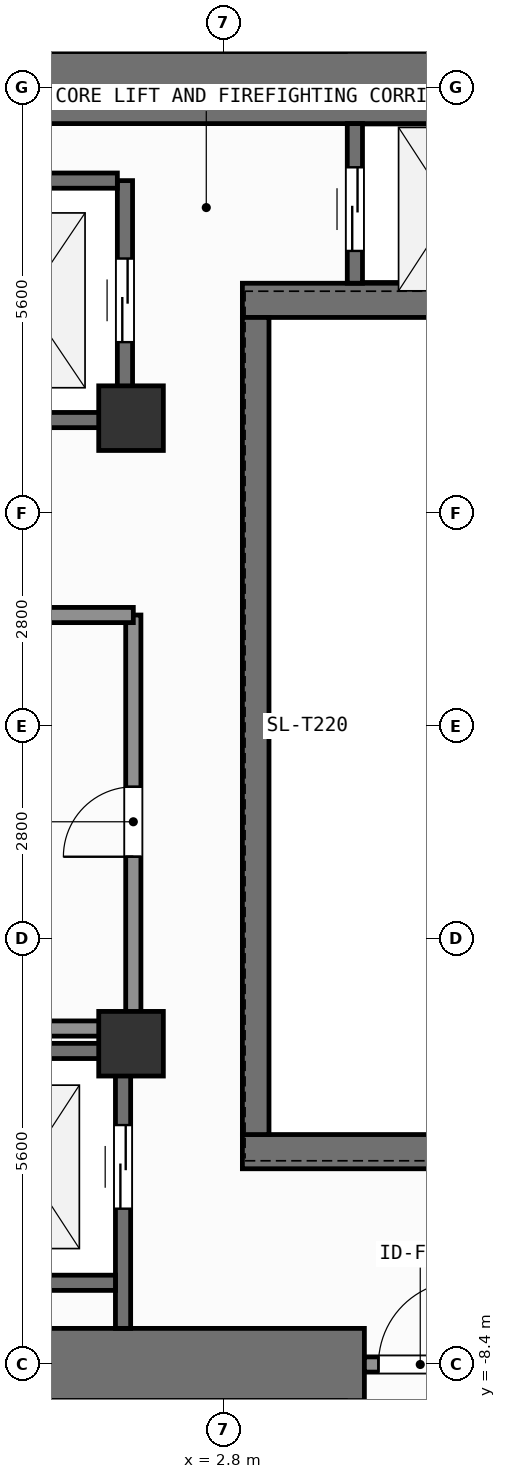
"""IFC4 building model, lengths in metres.
Left out: names, types, materials, properties, quantities, classifications, styles, units other than length and angle.
Written with IfcOpenShell. Run it as: python <this file> out.ifc"""

import sys

from ifc_helpers import new_model, si_unit, direction, frame, frame_2d, origin, origin_2d, place, context, subcontext, project, spatial, rectangle, extrude, element, fill, save


model = new_model("IFC4")
c1 = context("Model", 3, precision=1e-05, world=origin(), true_north=direction((0.0, 1.0)))
c2 = subcontext(c1, "Body", "Model", "MODEL_VIEW")
j1 = project(units=[si_unit("LENGTHUNIT", "METRE"), si_unit("PLANEANGLEUNIT", "RADIAN")], contexts=[c1])
p1 = place(None, origin())
s1 = spatial("IfcSite", under=j1, at=p1, CompositionType="ELEMENT")
p2 = place(p1, origin())
s2 = spatial("IfcBuilding", under=s1, at=p2, CompositionType="ELEMENT")
p3 = place(p2, frame((0.0, 0.0, 152.4)))
s3 = spatial("IfcBuildingStorey", under=s2, at=p3, CompositionType="ELEMENT", Elevation=152.4)
p4 = place(p3, frame((-2.62, -8.4, 0.0), z_axis=(0.0, 0.0, 1.0), x_axis=(1.0, 0.0, 0.0)))
e1 = element("IfcWall", 1, at=p4, inside=s3, PredefinedType="SHEAR", context=c2, shape_type="SweptSolid", body=[
    extrude(rectangle(XDim=7.27, YDim=0.95, at=frame_2d((3.635, 0.0))), origin(), (0.0, 0.0, 1.0), 3.9),
])
p5 = place(p3, frame((-7.55, 8.4, 0.0), z_axis=(0.0, 0.0, 1.0), x_axis=(1.0, 0.0, 0.0)))
e2 = element("IfcWall", 2, at=p5, inside=s3, PredefinedType="SHEAR", context=c2, shape_type="SweptSolid", body=[
    extrude(rectangle(XDim=16.425, YDim=0.95, at=frame_2d((8.212, 0.0))), origin(), (0.0, 0.0, 1.0), 3.9),
])
for number, where, z_axis, x_axis in (
    (3, (3.045, -5.6, 0.0), (0.0, 0.0, 1.0), (1.0, 0.0, 0.0)),
    (4, (3.045, 5.6, 0.0), (0.0, 0.0, 1.0), (1.0, 0.0, 0.0)),
):
    element("IfcWall", number, at=place(p3, frame(where, z_axis=z_axis, x_axis=x_axis)), inside=s3, PredefinedType="SHEAR", context=c2, shape_type="SweptSolid", body=[
        extrude(rectangle(XDim=5.83, YDim=0.45, at=frame_2d((2.915, 0.0))), origin(), (0.0, 0.0, 1.0), 3.9),
    ])
p6 = place(p3, frame((3.22, -5.375, 0.0), z_axis=(0.0, 0.0, 1.0), x_axis=(0.0, 1.0, 0.0)))
e5 = element("IfcWall", 5, at=p6, inside=s3, PredefinedType="SHEAR", context=c2, shape_type="SweptSolid", body=[
    extrude(rectangle(XDim=10.75, YDim=0.35, at=frame_2d((5.375, 0.0))), origin(), (0.0, 0.0, 1.0), 3.9),
])
for number, where, z_axis, x_axis in (
    (6, (1.58, -4.18, 0.0), (0.0, 0.0, 1.0), (1.0, 0.0, 0.0)),
    (7, (1.58, 4.05, 0.0), (0.0, 0.0, 1.0), (1.0, 0.0, 0.0)),
):
    element("IfcColumn", number, at=place(p3, frame(where, z_axis=z_axis, x_axis=x_axis)), inside=s3, PredefinedType="COLUMN", context=c2, shape_type="SweptSolid", body=[
        extrude(rectangle(XDim=0.85, YDim=0.85, at=origin_2d()), origin(), (0.0, 0.0, 1.0), 3.9),
    ])
p7 = place(p3, frame((1.5, 4.025, 0.0), z_axis=(0.0, 0.0, 1.0), x_axis=(0.0, 1.0, 0.0)))
e8 = element("IfcWall", 8, at=p7, inside=s3, PredefinedType="SHEAR", context=c2, shape_type="SweptSolid", body=[
    extrude(rectangle(XDim=3.15, YDim=0.2, at=frame_2d((1.575, 0.0))), origin(), (0.0, 0.0, 1.0), 3.6),
])
p8 = place(p7, frame((1.025, 0.0, 0.0)))
e9 = element("IfcOpeningElement", 9, at=p8, cuts=e8, PredefinedType="OPENING", context=c2, shape_type="SweptSolid", body=[
    extrude(rectangle(XDim=1.1, YDim=2.2, at=frame_2d((0.55, 1.1))), frame((0.0, 0.11, 0.0), z_axis=(0.0, -1.0, 0.0), x_axis=(1.0, 0.0, 0.0)), (0.0, 0.0, 1.0), 0.22),
])
for number, where, z_axis, x_axis in (
    (10, (-1.0, 4.025, 0.0), (0.0, 0.0, 1.0), (1.0, 0.0, 0.0)),
    (11, (-1.0, 7.175, 0.0), (0.0, 0.0, 1.0), (1.0, 0.0, 0.0)),
):
    element("IfcWall", number, at=place(p3, frame(where, z_axis=z_axis, x_axis=x_axis)), inside=s3, PredefinedType="SHEAR", context=c2, shape_type="SweptSolid", body=[
        extrude(rectangle(XDim=2.4, YDim=0.2, at=frame_2d((1.2, 0.0))), origin(), (0.0, 0.0, 1.0), 3.6),
    ])
p9 = place(p3, frame((1.475, -7.925, 0.0), z_axis=(0.0, 0.0, 1.0), x_axis=(0.0, 1.0, 0.0)))
e12 = element("IfcWall", 12, at=p9, inside=s3, PredefinedType="SHEAR", context=c2, shape_type="SweptSolid", body=[
    extrude(rectangle(XDim=3.65, YDim=0.2, at=frame_2d((1.825, 0.0))), origin(), (0.0, 0.0, 1.0), 3.6),
])
p10 = place(p9, frame((1.575, 0.0, 0.0)))
e13 = element("IfcOpeningElement", 13, at=p10, cuts=e12, PredefinedType="OPENING", context=c2, shape_type="SweptSolid", body=[
    extrude(rectangle(XDim=1.1, YDim=2.2, at=frame_2d((0.55, 1.1))), frame((0.0, 0.11, 0.0), z_axis=(0.0, -1.0, 0.0), x_axis=(1.0, 0.0, 0.0)), (0.0, 0.0, 1.0), 0.22),
])
for number, where, z_axis, x_axis in (
    (14, (-0.975, -7.325, 0.0), (0.0, 0.0, 1.0), (1.0, 0.0, 0.0)),
    (15, (-0.975, -4.275, 0.0), (0.0, 0.0, 1.0), (1.0, 0.0, 0.0)),
):
    element("IfcWall", number, at=place(p3, frame(where, z_axis=z_axis, x_axis=x_axis)), inside=s3, PredefinedType="SHEAR", context=c2, shape_type="SweptSolid", body=[
        extrude(rectangle(XDim=2.35, YDim=0.2, at=frame_2d((1.175, 0.0))), origin(), (0.0, 0.0, 1.0), 3.6),
    ])
p11 = place(p3, frame((4.525, 5.825, 0.0), z_axis=(0.0, 0.0, 1.0), x_axis=(0.0, 1.0, 0.0)))
e16 = element("IfcWall", 16, at=p11, inside=s3, PredefinedType="SHEAR", context=c2, shape_type="SweptSolid", body=[
    extrude(rectangle(XDim=2.1, YDim=0.2, at=frame_2d((1.05, 0.0))), origin(), (0.0, 0.0, 1.0), 3.6),
])
p12 = place(p11, frame((0.425, 0.0, 0.0)))
e17 = element("IfcOpeningElement", 17, at=p12, cuts=e16, PredefinedType="OPENING", context=c2, shape_type="SweptSolid", body=[
    extrude(rectangle(XDim=1.1, YDim=2.2, at=frame_2d((0.55, 1.1))), frame((0.0, 0.11, 0.0), z_axis=(0.0, -1.0, 0.0), x_axis=(1.0, 0.0, 0.0)), (0.0, 0.0, 1.0), 0.22),
])
p13 = place(p3, frame((4.65, -8.4, 0.0), z_axis=(0.0, 0.0, 1.0), x_axis=(1.0, 0.0, 0.0)))
e18 = element("IfcWall", 18, at=p13, inside=s3, PredefinedType="SOLIDWALL", context=c2, shape_type="SweptSolid", body=[
    extrude(rectangle(XDim=1.47, YDim=0.2, at=frame_2d((0.735, 0.0))), origin(), (0.0, 0.0, 1.0), 2.64),
])
p14 = place(p13, frame((0.185, 0.0, 0.0)))
e19 = element("IfcOpeningElement", 19, at=p14, cuts=e18, PredefinedType="OPENING", context=c2, shape_type="SweptSolid", body=[
    extrude(rectangle(XDim=1.1, YDim=2.15, at=frame_2d((0.55, 1.075))), frame((0.0, 0.11, 0.0), z_axis=(0.0, -1.0, 0.0), x_axis=(1.0, 0.0, 0.0)), (0.0, 0.0, 1.0), 0.22),
])
p15 = place(p3, frame((1.61, -3.98, 0.0), z_axis=(0.0, 0.0, 1.0), x_axis=(0.0, 1.0, 0.0)))
e20 = element("IfcWall", 20, at=p15, inside=s3, PredefinedType="SOLIDWALL", context=c2, shape_type="SweptSolid", body=[
    extrude(rectangle(XDim=5.44, YDim=0.2, at=frame_2d((2.72, 0.0))), origin(), (0.0, 0.0, 1.0), 3.6),
])
p16 = place(p15, frame((2.26, 0.0, 0.0)))
e21 = element("IfcOpeningElement", 21, at=p16, cuts=e20, PredefinedType="OPENING", context=c2, shape_type="SweptSolid", body=[
    extrude(rectangle(XDim=0.92, YDim=2.1, at=frame_2d((0.46, 1.05))), frame((0.0, 0.11, 0.0), z_axis=(0.0, -1.0, 0.0), x_axis=(1.0, 0.0, 0.0)), (0.0, 0.0, 1.0), 0.22),
])
for number, where, z_axis, x_axis in (
    (22, (-1.58, -3.98, 0.0), (0.0, 0.0, 1.0), (1.0, 0.0, 0.0)),
    (23, (-1.58, 1.46, 0.0), (0.0, 0.0, 1.0), (1.0, 0.0, 0.0)),
):
    element("IfcWall", number, at=place(p3, frame(where, z_axis=z_axis, x_axis=x_axis)), inside=s3, PredefinedType="SOLIDWALL", context=c2, shape_type="SweptSolid", body=[
        extrude(rectangle(XDim=3.19, YDim=0.2, at=frame_2d((1.595, 0.0))), origin(), (0.0, 0.0, 1.0), 3.6),
    ])
p17 = place(p8, origin())
e24 = element("IfcDoor", 24, at=p17, inside=s3, OperationType="SLIDING_TO_LEFT", PredefinedType="DOOR", context=c2, shape_type="SweptSolid", body=[
    extrude(rectangle(XDim=1.1, YDim=2.2, at=frame_2d((0.55, 1.1))), frame((0.0, 0.025, 0.0), z_axis=(0.0, -1.0, 0.0), x_axis=(1.0, 0.0, 0.0)), (0.0, 0.0, 1.0), 0.05),
])
fill(e9, e24)
p18 = place(p10, origin())
e25 = element("IfcDoor", 25, at=p18, inside=s3, OperationType="SLIDING_TO_LEFT", PredefinedType="DOOR", context=c2, shape_type="SweptSolid", body=[
    extrude(rectangle(XDim=1.1, YDim=2.2, at=frame_2d((0.55, 1.1))), frame((0.0, 0.025, 0.0), z_axis=(0.0, -1.0, 0.0), x_axis=(1.0, 0.0, 0.0)), (0.0, 0.0, 1.0), 0.05),
])
fill(e13, e25)
p19 = place(p12, origin())
e26 = element("IfcDoor", 26, at=p19, inside=s3, OperationType="SLIDING_TO_LEFT", PredefinedType="DOOR", context=c2, shape_type="SweptSolid", body=[
    extrude(rectangle(XDim=1.1, YDim=2.2, at=frame_2d((0.55, 1.1))), frame((0.0, 0.025, 0.0), z_axis=(0.0, -1.0, 0.0), x_axis=(1.0, 0.0, 0.0)), (0.0, 0.0, 1.0), 0.05),
])
fill(e17, e26)
p20 = place(p14, origin())
e27 = element("IfcDoor", 27, at=p20, inside=s3, OperationType="SINGLE_SWING_RIGHT", PredefinedType="DOOR", context=c2, shape_type="SweptSolid", body=[
    extrude(rectangle(XDim=1.1, YDim=2.15, at=frame_2d((0.55, 1.075))), frame((0.0, 0.025, 0.0), z_axis=(0.0, -1.0, 0.0), x_axis=(1.0, 0.0, 0.0)), (0.0, 0.0, 1.0), 0.05),
])
fill(e19, e27)
p21 = place(p16, origin())
e28 = element("IfcDoor", 28, at=p21, inside=s3, OperationType="SINGLE_SWING_LEFT", PredefinedType="DOOR", context=c2, shape_type="SweptSolid", body=[
    extrude(rectangle(XDim=0.92, YDim=2.1, at=frame_2d((0.46, 1.05))), frame((0.0, 0.025, 0.0), z_axis=(0.0, -1.0, 0.0), x_axis=(1.0, 0.0, 0.0)), (0.0, 0.0, 1.0), 0.05),
])
fill(e21, e28)
save(model, sys.argv[1])
